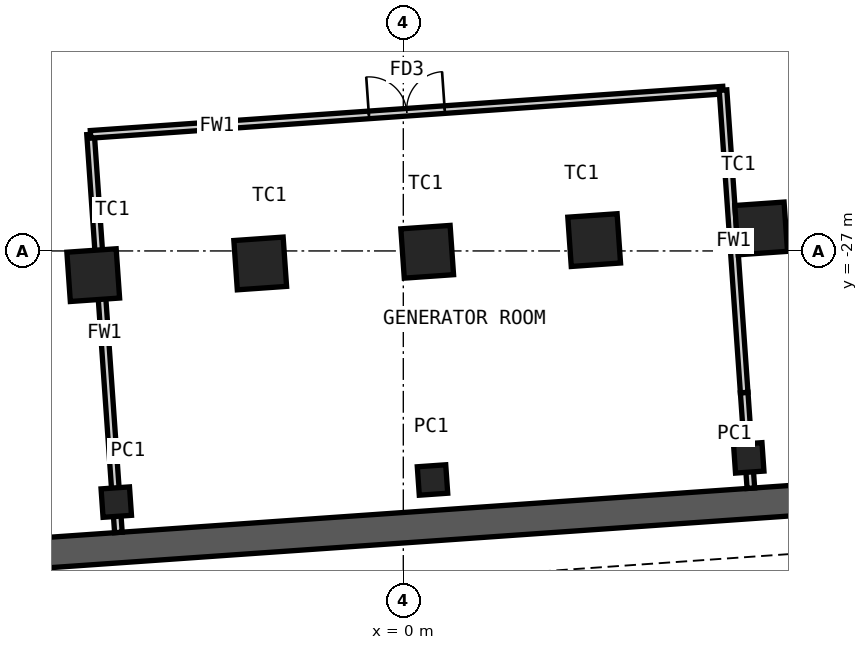
"""IFC4 building model, lengths in metres.
Left out: names, types, materials, properties, quantities, classifications, styles, units other than length and angle.
Written with IfcOpenShell. Run it as: python <this file> out.ifc"""

import sys

from ifc_helpers import new_model, si_unit, direction, frame, frame_2d, origin, origin_2d, place, context, subcontext, project, spatial, rectangle, hollow_rectangle, extrude, element, fill, save


model = new_model("IFC4")
c1 = context("Model", 3, precision=1e-05, world=origin(), true_north=direction((0.0, 1.0)))
c2 = subcontext(c1, "Body", "Model", "MODEL_VIEW")
j1 = project(units=[si_unit("LENGTHUNIT", "METRE"), si_unit("PLANEANGLEUNIT", "RADIAN")], contexts=[c1])
p1 = place(None, origin())
s1 = spatial("IfcSite", under=j1, at=p1, CompositionType="ELEMENT")
p2 = place(p1, origin())
s2 = spatial("IfcBuilding", under=s1, at=p2, CompositionType="ELEMENT")
p3 = place(p2, frame((0.0, 0.0, -12.0)))
s3 = spatial("IfcBuildingStorey", under=s2, at=p3, CompositionType="ELEMENT", Elevation=-12.0)
p4 = place(p3, frame((18.132, -33.016, -0.2), z_axis=(0.0, 0.0, 1.0), x_axis=(-0.997564165932, -0.069754819538, 0.0)))
e1 = element("IfcWall", 1, at=p4, inside=s3, PredefinedType="SHEAR", context=c2, shape_type="SweptSolid", body=[
    extrude(rectangle(XDim=34.755, YDim=0.8, at=frame_2d((17.377, 0.0))), origin(), (0.0, 0.0, 1.0), 6.2),
])
for number, where, z_axis, x_axis in (
    (2, (9.417, -26.407, -0.2), (0.0, 0.0, 1.0), (0.998, 0.07, 0.0)),
    (3, (5.023, -26.715, -0.2), (0.0, 0.0, 1.0), (0.998, 0.07, 0.0)),
    (4, (0.629, -27.022, -0.2), (0.0, 0.0, 1.0), (0.998, 0.07, 0.0)),
    (5, (-3.765, -27.329, -0.2), (0.0, 0.0, 1.0), (0.998, 0.07, 0.0)),
    (6, (-8.159, -27.636, -0.2), (0.0, 0.0, 1.0), (0.998, 0.07, 0.0)),
):
    element("IfcColumn", number, at=place(p3, frame(where, z_axis=z_axis, x_axis=x_axis)), inside=s3, PredefinedType="COLUMN", context=c2, shape_type="SweptSolid", body=[
        extrude(hollow_rectangle(XDim=1.3, YDim=1.3, WallThickness=0.1, at=origin_2d()), origin(), (0.0, 0.0, 1.0), 6.2),
    ])
for number, where, z_axis, x_axis in (
    (7, (9.09, -32.445, -0.2), (0.0, 0.0, 1.0), (0.998, 0.07, 0.0)),
    (8, (0.769, -33.027, -0.2), (0.0, 0.0, 1.0), (0.998, 0.07, 0.0)),
    (9, (-7.553, -33.609, -0.2), (0.0, 0.0, 1.0), (0.998, 0.07, 0.0)),
):
    element("IfcColumn", number, at=place(p3, frame(where, z_axis=z_axis, x_axis=x_axis)), inside=s3, PredefinedType="COLUMN", context=c2, shape_type="SweptSolid", body=[
        extrude(hollow_rectangle(XDim=0.75, YDim=0.75, WallThickness=0.036, at=origin_2d()), origin(), (0.0, 0.0, 1.0), 6.2),
    ])
p5 = place(p3, frame((9.146, -33.243, 0.0), z_axis=(0.0, 0.0, 1.0), x_axis=(-0.069554756913, 0.997578135181, 0.0)))
e10 = element("IfcWall", 10, at=p5, inside=s3, PredefinedType="PARTITIONING", context=c2, shape_type="SweptSolid", body=[
    extrude(rectangle(XDim=0.779, YDim=0.2, at=frame_2d((0.39, 0.0))), origin(), (0.0, 0.0, 1.0), 5.75),
])
p6 = place(p3, frame((-7.497, -34.407, 0.0), z_axis=(0.0, 0.0, 1.0), x_axis=(-0.069754853754, 0.997564163539, 0.0)))
e11 = element("IfcWall", 11, at=p6, inside=s3, PredefinedType="PARTITIONING", context=c2, shape_type="SweptSolid", body=[
    extrude(rectangle(XDim=10.5, YDim=0.2, at=frame_2d((5.25, 0.0))), origin(), (0.0, 0.0, 1.0), 5.75),
])
p7 = place(p3, frame((8.413, -22.769, 0.0), z_axis=(0.0, 0.0, 1.0), x_axis=(-0.997563888187, -0.069758791459, 0.0)))
e12 = element("IfcWall", 12, at=p7, inside=s3, PredefinedType="PARTITIONING", context=c2, shape_type="SweptSolid", body=[
    extrude(rectangle(XDim=16.683, YDim=0.2, at=frame_2d((8.342, 0.0))), origin(), (0.0, 0.0, 1.0), 5.75),
])
p8 = place(p7, frame((7.342, 0.0, 0.0)))
e13 = element("IfcOpeningElement", 13, at=p8, cuts=e12, PredefinedType="OPENING", context=c2, shape_type="SweptSolid", body=[
    extrude(rectangle(XDim=2.0, YDim=2.4, at=frame_2d((1.0, 1.2))), frame((0.0, 0.11, 0.0), z_axis=(0.0, -1.0, 0.0), x_axis=(1.0, 0.0, 0.0)), (0.0, 0.0, 1.0), 0.22),
])
p9 = place(p3, frame((9.092, -32.466, 0.0), z_axis=(0.0, 0.0, 1.0), x_axis=(-0.069873717935, 0.997555844824, 0.0)))
e14 = element("IfcWall", 14, at=p9, inside=s3, PredefinedType="PARTITIONING", context=c2, shape_type="SweptSolid", body=[
    extrude(rectangle(XDim=1.743, YDim=0.2, at=frame_2d((0.872, 0.0))), origin(), (0.0, 0.0, 1.0), 4.65),
])
p10 = place(p3, frame((8.97, -30.726, 0.0), z_axis=(0.0, 0.0, 1.0), x_axis=(-0.069748420123, 0.997564613391, 0.0)))
e15 = element("IfcWall", 15, at=p10, inside=s3, PredefinedType="PARTITIONING", context=c2, shape_type="SweptSolid", body=[
    extrude(rectangle(XDim=7.977, YDim=0.2, at=frame_2d((3.989, 0.0))), origin(), (0.0, 0.0, 1.0), 5.75),
])
p11 = place(p8, origin())
e16 = element("IfcDoor", 16, at=p11, inside=s3, OperationType="DOUBLE_DOOR_DOUBLE_SWING", PredefinedType="DOOR", context=c2, shape_type="SweptSolid", body=[
    extrude(rectangle(XDim=2.0, YDim=2.4, at=frame_2d((1.0, 1.2))), frame((0.0, 0.025, 0.0), z_axis=(0.0, -1.0, 0.0), x_axis=(1.0, 0.0, 0.0)), (0.0, 0.0, 1.0), 0.05),
])
fill(e13, e16)
save(model, sys.argv[1])
